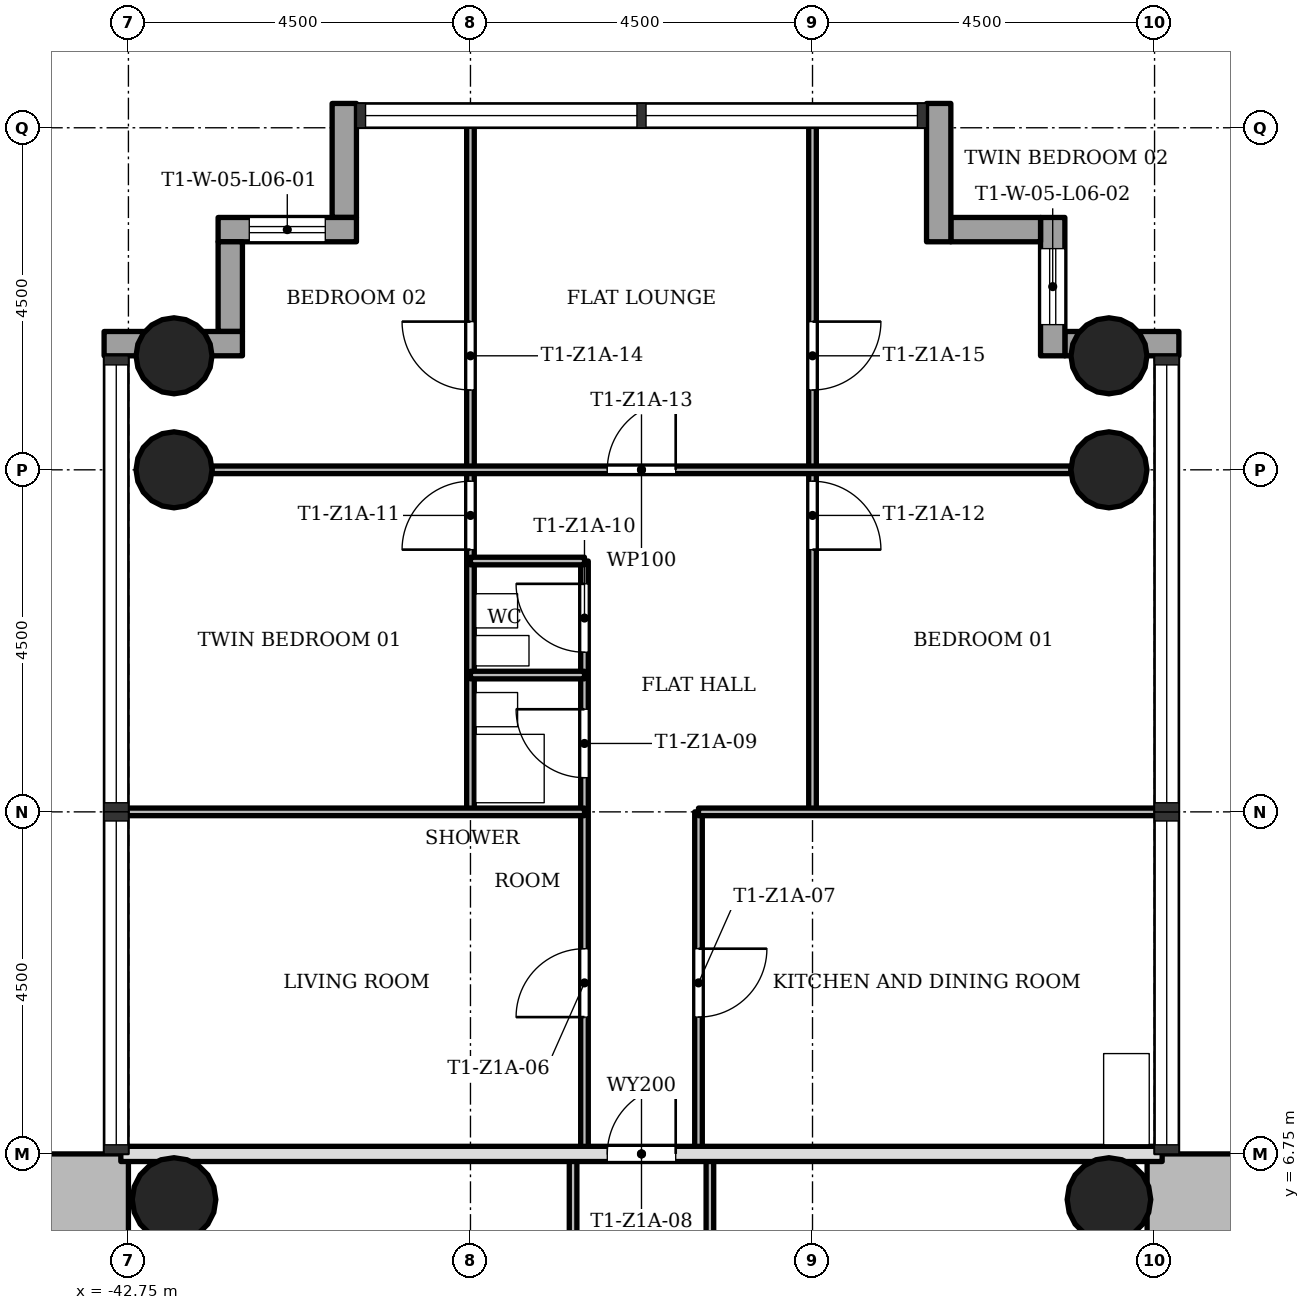
"""IFC4 building model, lengths in metres.
Left out: names, types, materials, properties, quantities, classifications, styles, units other than length and angle.
Written with IfcOpenShell. Run it as: python <this file> out.ifc"""

import sys

from ifc_helpers import new_model, si_unit, direction, frame, frame_2d, origin, origin_2d, place, context, subcontext, project, spatial, rectangle, hollow_circle, extrude, element, fill, save


model = new_model("IFC4")
c1 = context("Model", 3, precision=1e-05, world=origin(), true_north=direction((0.0, 1.0)))
c2 = subcontext(c1, "Body", "Model", "MODEL_VIEW")
j1 = project(units=[si_unit("LENGTHUNIT", "METRE"), si_unit("PLANEANGLEUNIT", "RADIAN")], contexts=[c1])
p1 = place(None, origin())
s1 = spatial("IfcSite", under=j1, at=p1, CompositionType="ELEMENT")
p2 = place(p1, origin())
s2 = spatial("IfcBuilding", under=s1, at=p2, CompositionType="ELEMENT")
p3 = place(p2, frame((0.0, 0.0, 27.9)))
s3 = spatial("IfcBuildingStorey", under=s2, at=p3, CompositionType="ELEMENT", Elevation=27.9)
p4 = place(p3, frame((-21.35, 6.2, 0.0), z_axis=(0.0, 0.0, 1.0), x_axis=(-1.0, 0.0, 0.0)))
e1 = element("IfcWall", 1, at=p4, inside=s3, PredefinedType="SHEAR", context=c2, shape_type="SweptSolid", body=[
    extrude(rectangle(XDim=7.998, YDim=1.1, at=frame_2d((3.999, 0.0))), origin(), (0.0, 0.0, 1.0), 3.4),
])
p5 = place(p3, frame((-43.3, -5.65, 0.0), z_axis=(0.0, 0.0, 1.0), x_axis=(0.0, 1.0, 0.0)))
e2 = element("IfcWall", 2, at=p5, inside=s3, PredefinedType="SHEAR", context=c2, shape_type="SweptSolid", body=[
    extrude(rectangle(XDim=12.4, YDim=1.1, at=frame_2d((6.2, 0.0))), origin(), (0.0, 0.0, 1.0), 3.4),
])
p6 = place(p5, frame((4.75, 0.0, 0.0)))
e3 = element("IfcOpeningElement", 3, at=p6, cuts=e2, PredefinedType="OPENING", context=c2, shape_type="SweptSolid", body=[
    extrude(rectangle(XDim=1.8, YDim=2.1, at=frame_2d((0.9, 1.05))), frame((0.0, 0.56, 0.0), z_axis=(0.0, -1.0, 0.0), x_axis=(1.0, 0.0, 0.0)), (0.0, 0.0, 1.0), 1.12),
])
for number, where, z_axis, x_axis in (
    (4, (-29.85, 15.75, 0.0), (0.0, 0.0, 1.0), (1.0, 0.0, 0.0)),
    (5, (-42.15, 15.75, 0.0), (0.0, 0.0, 1.0), (1.0, 0.0, 0.0)),
    (6, (-29.85, 17.25, 0.0), (0.0, 0.0, 1.0), (1.0, 0.0, 0.0)),
    (7, (-42.15, 17.25, 0.0), (0.0, 0.0, 1.0), (1.0, 0.0, 0.0)),
):
    element("IfcColumn", number, at=place(p3, frame(where, z_axis=z_axis, x_axis=x_axis)), inside=s3, PredefinedType="COLUMN", context=c2, shape_type="SweptSolid", body=[
        extrude(hollow_circle(Radius=0.5, WallThickness=0.036, at=origin_2d()), origin(), (0.0, 0.0, 1.0), 3.4),
    ])
for number, where, z_axis, x_axis in (
    (8, (-29.85, 6.15, 0.0), (0.0, 0.0, 1.0), (1.0, 0.0, 0.0)),
    (9, (-42.15, 6.15, 0.0), (0.0, 0.0, 1.0), (1.0, 0.0, 0.0)),
):
    element("IfcColumn", number, at=place(p3, frame(where, z_axis=z_axis, x_axis=x_axis)), inside=s3, PredefinedType="COLUMN", context=c2, shape_type="SweptSolid", body=[
        extrude(hollow_circle(Radius=0.55, WallThickness=0.04, at=origin_2d()), origin(), (0.0, 0.0, 1.0), 3.4),
    ])
p7 = place(p3, frame((-28.93, 17.41, -0.3), z_axis=(0.0, 0.0, 1.0), x_axis=(-1.0, 0.0, 0.0)))
e10 = element("IfcWall", 10, at=p7, inside=s3, PredefinedType="STANDARD", context=c2, shape_type="SweptSolid", body=[
    extrude(rectangle(XDim=1.5, YDim=0.32, at=frame_2d((0.75, 0.0))), origin(), (0.0, 0.0, 1.0), 3.4),
])
p8 = place(p3, frame((-30.59, 17.25, -0.3), z_axis=(0.0, 0.0, 1.0), x_axis=(0.0, 1.0, 0.0)))
e11 = element("IfcWall", 11, at=p8, inside=s3, PredefinedType="STANDARD", context=c2, shape_type="SweptSolid", body=[
    extrude(rectangle(XDim=1.82, YDim=0.32, at=frame_2d((0.91, 0.0))), origin(), (0.0, 0.0, 1.0), 3.4),
])
p9 = place(p8, frame((0.41, 0.0, 1.2)))
e12 = element("IfcOpeningElement", 12, at=p9, cuts=e11, PredefinedType="OPENING", context=c2, shape_type="SweptSolid", body=[
    extrude(rectangle(XDim=1.0, YDim=1.5, at=frame_2d((0.5, 0.75))), frame((0.0, 0.17, 0.0), z_axis=(0.0, -1.0, 0.0), x_axis=(1.0, 0.0, 0.0)), (0.0, 0.0, 1.0), 0.34),
])
p10 = place(p3, frame((-30.75, 18.91, -0.3), z_axis=(0.0, 0.0, 1.0), x_axis=(-1.0, 0.0, 0.0)))
e13 = element("IfcWall", 13, at=p10, inside=s3, PredefinedType="STANDARD", context=c2, shape_type="SweptSolid", body=[
    extrude(rectangle(XDim=1.18, YDim=0.32, at=frame_2d((0.59, 0.0))), origin(), (0.0, 0.0, 1.0), 3.4),
])
p11 = place(p3, frame((-32.09, 18.75, -0.3), z_axis=(0.0, 0.0, 1.0), x_axis=(0.0, 1.0, 0.0)))
e14 = element("IfcWall", 14, at=p11, inside=s3, PredefinedType="STANDARD", context=c2, shape_type="SweptSolid", body=[
    extrude(rectangle(XDim=1.82, YDim=0.32, at=frame_2d((0.91, 0.0))), origin(), (0.0, 0.0, 1.0), 3.4),
])
p12 = place(p3, frame((-39.91, 20.57, -0.3), z_axis=(0.0, 0.0, 1.0), x_axis=(0.0, -1.0, 0.0)))
e15 = element("IfcWall", 15, at=p12, inside=s3, PredefinedType="STANDARD", context=c2, shape_type="SweptSolid", body=[
    extrude(rectangle(XDim=1.5, YDim=0.32, at=frame_2d((0.75, 0.0))), origin(), (0.0, 0.0, 1.0), 3.4),
])
p13 = place(p3, frame((-39.75, 18.91, -0.3), z_axis=(0.0, 0.0, 1.0), x_axis=(-1.0, 0.0, 0.0)))
e16 = element("IfcWall", 16, at=p13, inside=s3, PredefinedType="STANDARD", context=c2, shape_type="SweptSolid", body=[
    extrude(rectangle(XDim=1.82, YDim=0.32, at=frame_2d((0.91, 0.0))), origin(), (0.0, 0.0, 1.0), 3.4),
])
p14 = place(p13, frame((0.41, 0.0, 1.2)))
e17 = element("IfcOpeningElement", 17, at=p14, cuts=e16, PredefinedType="OPENING", context=c2, shape_type="SweptSolid", body=[
    extrude(rectangle(XDim=1.0, YDim=1.5, at=frame_2d((0.5, 0.75))), frame((0.0, 0.17, 0.0), z_axis=(0.0, -1.0, 0.0), x_axis=(1.0, 0.0, 0.0)), (0.0, 0.0, 1.0), 0.34),
])
p15 = place(p3, frame((-41.41, 18.75, -0.3), z_axis=(0.0, 0.0, 1.0), x_axis=(0.0, -1.0, 0.0)))
e18 = element("IfcWall", 18, at=p15, inside=s3, PredefinedType="STANDARD", context=c2, shape_type="SweptSolid", body=[
    extrude(rectangle(XDim=1.18, YDim=0.32, at=frame_2d((0.59, 0.0))), origin(), (0.0, 0.0, 1.0), 3.4),
])
p16 = place(p3, frame((-41.25, 17.41, -0.3), z_axis=(0.0, 0.0, 1.0), x_axis=(-1.0, 0.0, 0.0)))
e19 = element("IfcWall", 19, at=p16, inside=s3, PredefinedType="STANDARD", context=c2, shape_type="SweptSolid", body=[
    extrude(rectangle(XDim=1.82, YDim=0.32, at=frame_2d((0.91, 0.0))), origin(), (0.0, 0.0, 1.0), 3.4),
])
p17 = place(p3, frame((-38.25, 11.25, 0.0), z_axis=(0.0, 0.0, 1.0), x_axis=(0.0, 1.0, 0.0)))
e20 = element("IfcWall", 20, at=p17, inside=s3, PredefinedType="PARTITIONING", context=c2, shape_type="SweptSolid", body=[
    extrude(rectangle(XDim=9.1, YDim=0.1, at=frame_2d((4.55, 0.0))), origin(), (0.0, 0.0, 1.0), 3.0),
])
p18 = place(p17, frame((3.45, 0.0, 0.0)))
e21 = element("IfcOpeningElement", 21, at=p18, cuts=e20, PredefinedType="OPENING", context=c2, shape_type="SweptSolid", body=[
    extrude(rectangle(XDim=0.9, YDim=2.1, at=frame_2d((0.45, 1.05))), frame((0.0, 0.06, 0.0), z_axis=(0.0, -1.0, 0.0), x_axis=(1.0, 0.0, 0.0)), (0.0, 0.0, 1.0), 0.12),
])
p19 = place(p17, frame((5.55, 0.0, 0.0)))
e22 = element("IfcOpeningElement", 22, at=p19, cuts=e20, PredefinedType="OPENING", context=c2, shape_type="SweptSolid", body=[
    extrude(rectangle(XDim=0.9, YDim=2.1, at=frame_2d((0.45, 1.05))), frame((0.0, 0.06, 0.0), z_axis=(0.0, -1.0, 0.0), x_axis=(1.0, 0.0, 0.0)), (0.0, 0.0, 1.0), 0.12),
])
p20 = place(p3, frame((-36.9, 1.5, 0.0), z_axis=(0.0, 0.0, 1.0), x_axis=(0.0, 1.0, 0.0)))
e23 = element("IfcWall", 23, at=p20, inside=s3, PredefinedType="PARTITIONING", context=c2, shape_type="SweptSolid", body=[
    extrude(rectangle(XDim=5.25, YDim=0.1, at=frame_2d((2.625, 0.0))), origin(), (0.0, 0.0, 1.0), 3.0),
])
p21 = place(p3, frame((-36.75, 6.75, 0.0), z_axis=(0.0, 0.0, 1.0), x_axis=(0.0, 1.0, 0.0)))
e24 = element("IfcWall", 24, at=p21, inside=s3, PredefinedType="PARTITIONING", context=c2, shape_type="SweptSolid", body=[
    extrude(rectangle(XDim=7.8, YDim=0.1, at=frame_2d((3.9, 0.0))), origin(), (0.0, 0.0, 1.0), 3.0),
])
p22 = place(p21, frame((1.8, 0.0, 0.0)))
e25 = element("IfcOpeningElement", 25, at=p22, cuts=e24, PredefinedType="OPENING", context=c2, shape_type="SweptSolid", body=[
    extrude(rectangle(XDim=0.9, YDim=2.1, at=frame_2d((0.45, 1.05))), frame((0.0, 0.06, 0.0), z_axis=(0.0, -1.0, 0.0), x_axis=(1.0, 0.0, 0.0)), (0.0, 0.0, 1.0), 0.12),
])
p23 = place(p21, frame((4.95, 0.0, 0.0)))
e26 = element("IfcOpeningElement", 26, at=p23, cuts=e24, PredefinedType="OPENING", context=c2, shape_type="SweptSolid", body=[
    extrude(rectangle(XDim=0.9, YDim=2.1, at=frame_2d((0.45, 1.05))), frame((0.0, 0.06, 0.0), z_axis=(0.0, -1.0, 0.0), x_axis=(1.0, 0.0, 0.0)), (0.0, 0.0, 1.0), 0.12),
])
p24 = place(p21, frame((6.6, 0.0, 0.0)))
e27 = element("IfcOpeningElement", 27, at=p24, cuts=e24, PredefinedType="OPENING", context=c2, shape_type="SweptSolid", body=[
    extrude(rectangle(XDim=0.9, YDim=2.1, at=frame_2d((0.45, 1.05))), frame((0.0, 0.06, 0.0), z_axis=(0.0, -1.0, 0.0), x_axis=(1.0, 0.0, 0.0)), (0.0, 0.0, 1.0), 0.12),
])
p25 = place(p3, frame((-35.25, 6.75, 0.0), z_axis=(0.0, 0.0, 1.0), x_axis=(0.0, 1.0, 0.0)))
e28 = element("IfcWall", 28, at=p25, inside=s3, PredefinedType="PARTITIONING", context=c2, shape_type="SweptSolid", body=[
    extrude(rectangle(XDim=4.5, YDim=0.1, at=frame_2d((2.25, 0.0))), origin(), (0.0, 0.0, 1.0), 3.0),
])
p26 = place(p25, frame((1.8, 0.0, 0.0)))
e29 = element("IfcOpeningElement", 29, at=p26, cuts=e28, PredefinedType="OPENING", context=c2, shape_type="SweptSolid", body=[
    extrude(rectangle(XDim=0.9, YDim=2.1, at=frame_2d((0.45, 1.05))), frame((0.0, 0.06, 0.0), z_axis=(0.0, -1.0, 0.0), x_axis=(1.0, 0.0, 0.0)), (0.0, 0.0, 1.0), 0.12),
])
p27 = place(p3, frame((-35.1, 1.5, 0.0), z_axis=(0.0, 0.0, 1.0), x_axis=(0.0, 1.0, 0.0)))
e30 = element("IfcWall", 30, at=p27, inside=s3, PredefinedType="PARTITIONING", context=c2, shape_type="SweptSolid", body=[
    extrude(rectangle(XDim=5.25, YDim=0.1, at=frame_2d((2.625, 0.0))), origin(), (0.0, 0.0, 1.0), 3.0),
])
p28 = place(p27, frame((0.75, 0.0, 0.0)))
e31 = element("IfcOpeningElement", 31, at=p28, cuts=e30, PredefinedType="OPENING", context=c2, shape_type="SweptSolid", body=[
    extrude(rectangle(XDim=0.9, YDim=2.1, at=frame_2d((0.45, 1.05))), frame((0.0, 0.06, 0.0), z_axis=(0.0, -1.0, 0.0), x_axis=(1.0, 0.0, 0.0)), (0.0, 0.0, 1.0), 0.12),
])
p29 = place(p3, frame((-33.75, 11.25, 0.0), z_axis=(0.0, 0.0, 1.0), x_axis=(0.0, 1.0, 0.0)))
e32 = element("IfcWall", 32, at=p29, inside=s3, PredefinedType="PARTITIONING", context=c2, shape_type="SweptSolid", body=[
    extrude(rectangle(XDim=9.1, YDim=0.1, at=frame_2d((4.55, 0.0))), origin(), (0.0, 0.0, 1.0), 3.0),
])
p30 = place(p29, frame((3.45, 0.0, 0.0)))
e33 = element("IfcOpeningElement", 33, at=p30, cuts=e32, PredefinedType="OPENING", context=c2, shape_type="SweptSolid", body=[
    extrude(rectangle(XDim=0.9, YDim=2.1, at=frame_2d((0.45, 1.05))), frame((0.0, 0.06, 0.0), z_axis=(0.0, -1.0, 0.0), x_axis=(1.0, 0.0, 0.0)), (0.0, 0.0, 1.0), 0.12),
])
p31 = place(p29, frame((5.55, 0.0, 0.0)))
e34 = element("IfcOpeningElement", 34, at=p31, cuts=e32, PredefinedType="OPENING", context=c2, shape_type="SweptSolid", body=[
    extrude(rectangle(XDim=0.9, YDim=2.1, at=frame_2d((0.45, 1.05))), frame((0.0, 0.06, 0.0), z_axis=(0.0, -1.0, 0.0), x_axis=(1.0, 0.0, 0.0)), (0.0, 0.0, 1.0), 0.12),
])
p32 = place(p3, frame((-42.85, 6.75, 0.0), z_axis=(0.0, 0.0, 1.0), x_axis=(1.0, 0.0, 0.0)))
e35 = element("IfcWall", 35, at=p32, inside=s3, PredefinedType="SOLIDWALL", context=c2, shape_type="SweptSolid", body=[
    extrude(rectangle(XDim=13.7, YDim=0.2, at=frame_2d((6.85, 0.0))), origin(), (0.0, 0.0, 1.0), 3.0),
])
p33 = place(p32, frame((6.4, 0.0, 0.0)))
e36 = element("IfcOpeningElement", 36, at=p33, cuts=e35, PredefinedType="OPENING", context=c2, shape_type="SweptSolid", body=[
    extrude(rectangle(XDim=0.9, YDim=2.1, at=frame_2d((0.45, 1.05))), frame((0.0, 0.11, 0.0), z_axis=(0.0, -1.0, 0.0), x_axis=(1.0, 0.0, 0.0)), (0.0, 0.0, 1.0), 0.22),
])
for number, where, z_axis, x_axis in (
    (37, (-42.85, 11.25, 0.0), (0.0, 0.0, 1.0), (1.0, 0.0, 0.0)),
    (38, (-35.25, 11.25, 0.0), (0.0, 0.0, 1.0), (1.0, 0.0, 0.0)),
):
    element("IfcWall", number, at=place(p3, frame(where, z_axis=z_axis, x_axis=x_axis)), inside=s3, PredefinedType="PARTITIONING", context=c2, shape_type="SweptSolid", body=[
        extrude(rectangle(XDim=6.1, YDim=0.1, at=frame_2d((3.05, 0.0))), origin(), (0.0, 0.0, 1.0), 3.0),
    ])
for number, where, z_axis, x_axis in (
    (39, (-38.25, 13.05, 0.0), (0.0, 0.0, 1.0), (1.0, 0.0, 0.0)),
    (40, (-38.25, 14.55, 0.0), (0.0, 0.0, 1.0), (1.0, 0.0, 0.0)),
):
    element("IfcWall", number, at=place(p3, frame(where, z_axis=z_axis, x_axis=x_axis)), inside=s3, PredefinedType="PARTITIONING", context=c2, shape_type="SweptSolid", body=[
        extrude(rectangle(XDim=1.5, YDim=0.1, at=frame_2d((0.75, 0.0))), origin(), (0.0, 0.0, 1.0), 3.0),
    ])
p34 = place(p3, frame((-41.65, 15.75, 0.0), z_axis=(0.0, 0.0, 1.0), x_axis=(1.0, 0.0, 0.0)))
e41 = element("IfcWall", 41, at=p34, inside=s3, PredefinedType="PARTITIONING", context=c2, shape_type="SweptSolid", body=[
    extrude(rectangle(XDim=11.3, YDim=0.1, at=frame_2d((5.65, 0.0))), origin(), (0.0, 0.0, 1.0), 3.0),
])
p35 = place(p34, frame((5.2, 0.0, 0.0)))
e42 = element("IfcOpeningElement", 42, at=p35, cuts=e41, PredefinedType="OPENING", context=c2, shape_type="SweptSolid", body=[
    extrude(rectangle(XDim=0.9, YDim=2.1, at=frame_2d((0.45, 1.05))), frame((0.0, 0.06, 0.0), z_axis=(0.0, -1.0, 0.0), x_axis=(1.0, 0.0, 0.0)), (0.0, 0.0, 1.0), 0.12),
])
p36 = place(p22, origin())
e43 = element("IfcDoor", 43, at=p36, inside=s3, OperationType="SINGLE_SWING_RIGHT", PredefinedType="DOOR", context=c2, shape_type="SweptSolid", body=[
    extrude(rectangle(XDim=0.9, YDim=2.1, at=frame_2d((0.45, 1.05))), frame((0.0, 0.025, 0.0), z_axis=(0.0, -1.0, 0.0), x_axis=(1.0, 0.0, 0.0)), (0.0, 0.0, 1.0), 0.05),
])
fill(e25, e43)
p37 = place(p26, origin())
e44 = element("IfcDoor", 44, at=p37, inside=s3, OperationType="SINGLE_SWING_RIGHT", PredefinedType="DOOR", context=c2, shape_type="SweptSolid", body=[
    extrude(rectangle(XDim=0.9, YDim=2.1, at=frame_2d((0.45, 1.05))), frame((0.0, 0.025, 0.0), z_axis=(0.0, -1.0, 0.0), x_axis=(1.0, 0.0, 0.0)), (0.0, 0.0, 1.0), 0.05),
])
fill(e29, e44)
p38 = place(p33, origin())
e45 = element("IfcDoor", 45, at=p38, inside=s3, OperationType="SINGLE_SWING_LEFT", PredefinedType="DOOR", context=c2, shape_type="SweptSolid", body=[
    extrude(rectangle(XDim=0.9, YDim=2.1, at=frame_2d((0.45, 1.05))), frame((0.0, 0.025, 0.0), z_axis=(0.0, -1.0, 0.0), x_axis=(1.0, 0.0, 0.0)), (0.0, 0.0, 1.0), 0.05),
])
fill(e36, e45)
p39 = place(p23, origin())
e46 = element("IfcDoor", 46, at=p39, inside=s3, OperationType="SINGLE_SWING_LEFT", PredefinedType="DOOR", context=c2, shape_type="SweptSolid", body=[
    extrude(rectangle(XDim=0.9, YDim=2.1, at=frame_2d((0.45, 1.05))), frame((0.0, 0.025, 0.0), z_axis=(0.0, -1.0, 0.0), x_axis=(1.0, 0.0, 0.0)), (0.0, 0.0, 1.0), 0.05),
])
fill(e26, e46)
p40 = place(p24, origin())
e47 = element("IfcDoor", 47, at=p40, inside=s3, OperationType="SINGLE_SWING_LEFT", PredefinedType="DOOR", context=c2, shape_type="SweptSolid", body=[
    extrude(rectangle(XDim=0.9, YDim=2.1, at=frame_2d((0.45, 1.05))), frame((0.0, 0.025, 0.0), z_axis=(0.0, -1.0, 0.0), x_axis=(1.0, 0.0, 0.0)), (0.0, 0.0, 1.0), 0.05),
])
fill(e27, e47)
p41 = place(p18, origin())
e48 = element("IfcDoor", 48, at=p41, inside=s3, OperationType="SINGLE_SWING_RIGHT", PredefinedType="DOOR", context=c2, shape_type="SweptSolid", body=[
    extrude(rectangle(XDim=0.9, YDim=2.1, at=frame_2d((0.45, 1.05))), frame((0.0, 0.025, 0.0), z_axis=(0.0, -1.0, 0.0), x_axis=(1.0, 0.0, 0.0)), (0.0, 0.0, 1.0), 0.05),
])
fill(e21, e48)
p42 = place(p30, origin())
e49 = element("IfcDoor", 49, at=p42, inside=s3, OperationType="SINGLE_SWING_LEFT", PredefinedType="DOOR", context=c2, shape_type="SweptSolid", body=[
    extrude(rectangle(XDim=0.9, YDim=2.1, at=frame_2d((0.45, 1.05))), frame((0.0, 0.025, 0.0), z_axis=(0.0, -1.0, 0.0), x_axis=(1.0, 0.0, 0.0)), (0.0, 0.0, 1.0), 0.05),
])
fill(e33, e49)
p43 = place(p35, origin())
e50 = element("IfcDoor", 50, at=p43, inside=s3, OperationType="SINGLE_SWING_LEFT", PredefinedType="DOOR", context=c2, shape_type="SweptSolid", body=[
    extrude(rectangle(XDim=0.9, YDim=2.1, at=frame_2d((0.45, 1.05))), frame((0.0, 0.025, 0.0), z_axis=(0.0, -1.0, 0.0), x_axis=(1.0, 0.0, 0.0)), (0.0, 0.0, 1.0), 0.05),
])
fill(e42, e50)
p44 = place(p19, origin())
e51 = element("IfcDoor", 51, at=p44, inside=s3, OperationType="SINGLE_SWING_LEFT", PredefinedType="DOOR", context=c2, shape_type="SweptSolid", body=[
    extrude(rectangle(XDim=0.9, YDim=2.1, at=frame_2d((0.45, 1.05))), frame((0.0, 0.025, 0.0), z_axis=(0.0, -1.0, 0.0), x_axis=(1.0, 0.0, 0.0)), (0.0, 0.0, 1.0), 0.05),
])
fill(e22, e51)
p45 = place(p31, origin())
e52 = element("IfcDoor", 52, at=p45, inside=s3, OperationType="SINGLE_SWING_RIGHT", PredefinedType="DOOR", context=c2, shape_type="SweptSolid", body=[
    extrude(rectangle(XDim=0.9, YDim=2.1, at=frame_2d((0.45, 1.05))), frame((0.0, 0.025, 0.0), z_axis=(0.0, -1.0, 0.0), x_axis=(1.0, 0.0, 0.0)), (0.0, 0.0, 1.0), 0.05),
])
fill(e34, e52)
p46 = place(p14, origin())
e53 = element("IfcWindow", 53, at=p46, inside=s3, PartitioningType="SINGLE_PANEL", PredefinedType="WINDOW", context=c2, shape_type="SweptSolid", body=[
    extrude(rectangle(XDim=1.0, YDim=1.5, at=frame_2d((0.5, 0.75))), frame((0.0, 0.03, 0.0), z_axis=(0.0, -1.0, 0.0), x_axis=(1.0, 0.0, 0.0)), (0.0, 0.0, 1.0), 0.06),
])
fill(e17, e53)
p47 = place(p9, origin())
e54 = element("IfcWindow", 54, at=p47, inside=s3, PartitioningType="SINGLE_PANEL", PredefinedType="WINDOW", context=c2, shape_type="SweptSolid", body=[
    extrude(rectangle(XDim=1.0, YDim=1.5, at=frame_2d((0.5, 0.75))), frame((0.0, 0.03, 0.0), z_axis=(0.0, -1.0, 0.0), x_axis=(1.0, 0.0, 0.0)), (0.0, 0.0, 1.0), 0.06),
])
fill(e12, e54)
save(model, sys.argv[1])
